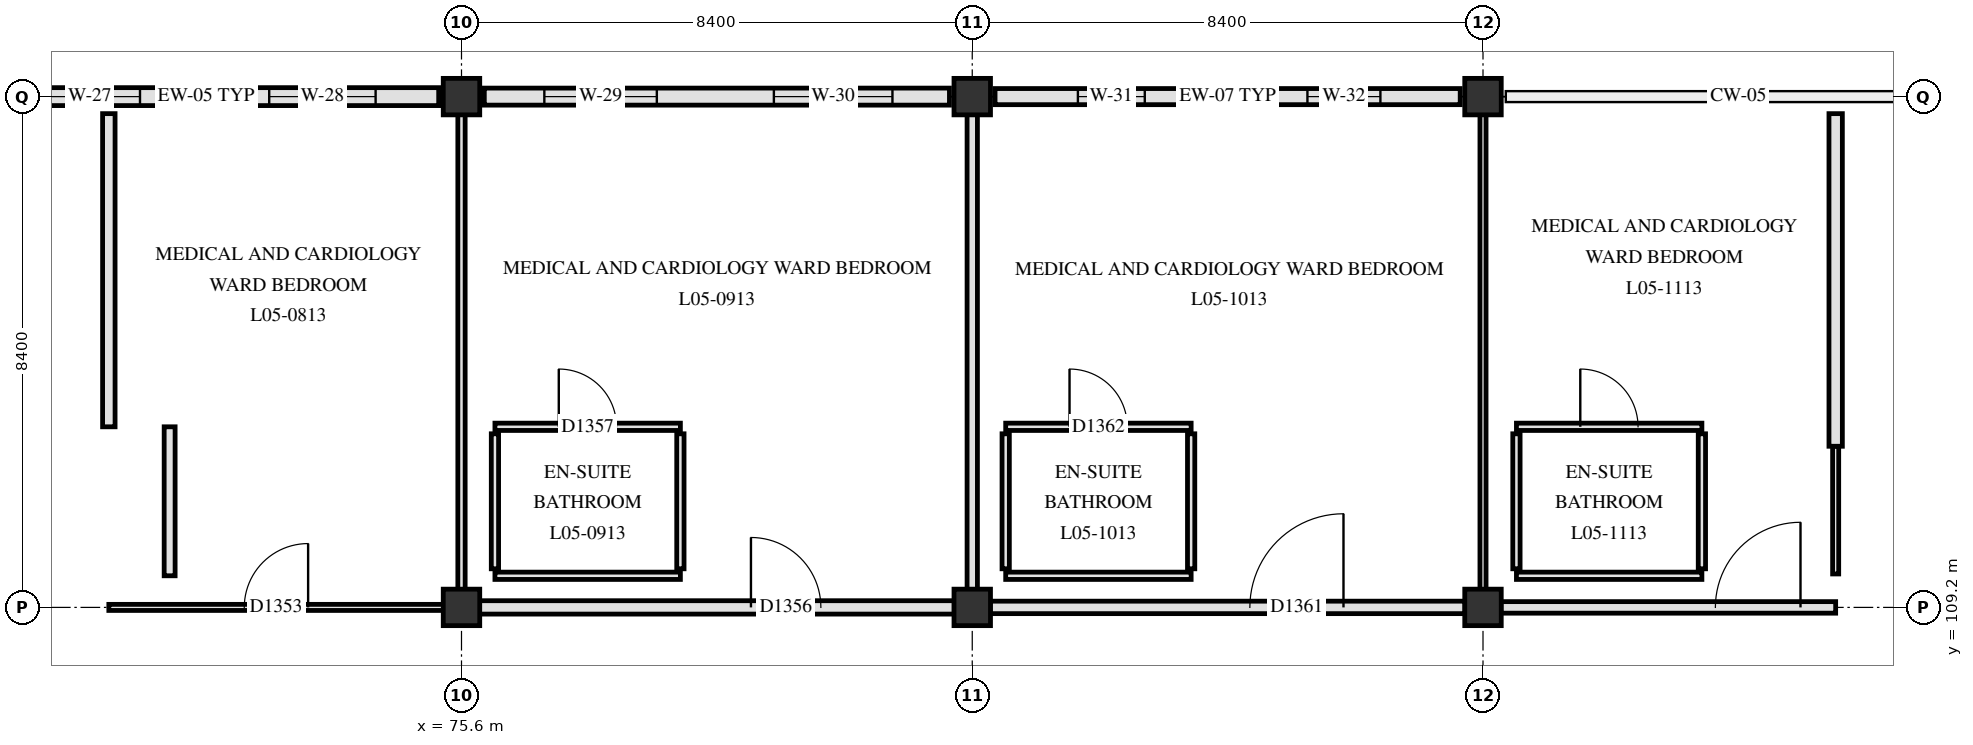
"""IFC4 building model, lengths in metres.
Left out: names, types, materials, properties, quantities, classifications, styles, units other than length and angle.
Written with IfcOpenShell. Run it as: python <this file> out.ifc"""

import sys

from ifc_helpers import new_model, si_unit, direction, frame, frame_2d, origin, origin_2d, place, context, subcontext, project, spatial, rectangle, extrude, element, fill, save


model = new_model("IFC4")
c1 = context("Model", 3, precision=1e-05, world=origin(), true_north=direction((0.0, 1.0)))
c2 = subcontext(c1, "Body", "Model", "MODEL_VIEW")
j1 = project(units=[si_unit("LENGTHUNIT", "METRE"), si_unit("PLANEANGLEUNIT", "RADIAN")], contexts=[c1])
p1 = place(None, origin())
s1 = spatial("IfcSite", under=j1, at=p1, CompositionType="ELEMENT")
p2 = place(p1, origin())
s2 = spatial("IfcBuilding", under=s1, at=p2, CompositionType="ELEMENT")
p3 = place(p2, frame((0.0, 0.0, 22.5)))
s3 = spatial("IfcBuildingStorey", under=s2, at=p3, CompositionType="ELEMENT", Elevation=22.5)
for number, where, z_axis, x_axis in (
    (1, (75.6, 109.2, 0.0), (0.0, 0.0, 1.0), (1.0, 0.0, 0.0)),
    (2, (75.6, 117.6, 0.0), (0.0, 0.0, 1.0), (1.0, 0.0, 0.0)),
    (3, (84.0, 109.2, 0.0), (0.0, 0.0, 1.0), (1.0, 0.0, 0.0)),
    (4, (84.0, 117.6, 0.0), (0.0, 0.0, 1.0), (1.0, 0.0, 0.0)),
    (5, (92.4, 109.2, 0.0), (0.0, 0.0, 1.0), (1.0, 0.0, 0.0)),
    (6, (92.4, 117.6, 0.0), (0.0, 0.0, 1.0), (1.0, 0.0, 0.0)),
):
    element("IfcColumn", number, at=place(p3, frame(where, z_axis=z_axis, x_axis=x_axis)), inside=s3, PredefinedType="COLUMN", context=c2, shape_type="SweptSolid", body=[
        extrude(rectangle(XDim=0.6, YDim=0.6, at=origin_2d()), origin(), (0.0, 0.0, 1.0), 3.9),
    ])
p4 = place(p3, frame((67.575, 117.6, 0.0), z_axis=(0.0, 0.0, 1.0), x_axis=(1.0, 0.0, 0.0)))
e7 = element("IfcWall", 7, at=p4, inside=s3, PredefinedType="SOLIDWALL", context=c2, shape_type="SweptSolid", body=[
    extrude(rectangle(XDim=7.65, YDim=0.295, at=frame_2d((3.825, 0.0))), origin(), (0.0, 0.0, 1.0), 3.31),
])
p5 = place(p4, frame((1.087, 0.0, 0.85)))
e8 = element("IfcOpeningElement", 8, at=p5, cuts=e7, PredefinedType="OPENING", context=c2, shape_type="SweptSolid", body=[
    extrude(rectangle(XDim=1.65, YDim=1.54, at=frame_2d((0.825, 0.77))), frame((0.0, 0.157, 0.0), z_axis=(0.0, -1.0, 0.0), x_axis=(1.0, 0.0, 0.0)), (0.0, 0.0, 1.0), 0.315),
])
p6 = place(p4, frame((4.863, 0.0, 0.85)))
e9 = element("IfcOpeningElement", 9, at=p6, cuts=e7, PredefinedType="OPENING", context=c2, shape_type="SweptSolid", body=[
    extrude(rectangle(XDim=1.75, YDim=1.54, at=frame_2d((0.875, 0.77))), frame((0.0, 0.157, 0.0), z_axis=(0.0, -1.0, 0.0), x_axis=(1.0, 0.0, 0.0)), (0.0, 0.0, 1.0), 0.315),
])
p7 = place(p3, frame((75.975, 117.6, 0.0), z_axis=(0.0, 0.0, 1.0), x_axis=(1.0, 0.0, 0.0)))
e10 = element("IfcWall", 10, at=p7, inside=s3, PredefinedType="SOLIDWALL", context=c2, shape_type="SweptSolid", body=[
    extrude(rectangle(XDim=7.65, YDim=0.28, at=frame_2d((3.825, 0.0))), origin(), (0.0, 0.0, 1.0), 3.31),
])
p8 = place(p7, frame((0.988, 0.0, 0.85)))
e11 = element("IfcOpeningElement", 11, at=p8, cuts=e10, PredefinedType="OPENING", context=c2, shape_type="SweptSolid", body=[
    extrude(rectangle(XDim=1.85, YDim=1.54, at=frame_2d((0.925, 0.77))), frame((0.0, 0.15, 0.0), z_axis=(0.0, -1.0, 0.0), x_axis=(1.0, 0.0, 0.0)), (0.0, 0.0, 1.0), 0.3),
])
p9 = place(p7, frame((4.762, 0.0, 0.85)))
e12 = element("IfcOpeningElement", 12, at=p9, cuts=e10, PredefinedType="OPENING", context=c2, shape_type="SweptSolid", body=[
    extrude(rectangle(XDim=1.95, YDim=1.54, at=frame_2d((0.975, 0.77))), frame((0.0, 0.15, 0.0), z_axis=(0.0, -1.0, 0.0), x_axis=(1.0, 0.0, 0.0)), (0.0, 0.0, 1.0), 0.3),
])
p10 = place(p3, frame((84.375, 117.6, 0.0), z_axis=(0.0, 0.0, 1.0), x_axis=(1.0, 0.0, 0.0)))
e13 = element("IfcWall", 13, at=p10, inside=s3, PredefinedType="SOLIDWALL", context=c2, shape_type="SweptSolid", body=[
    extrude(rectangle(XDim=7.65, YDim=0.265, at=frame_2d((3.825, 0.0))), origin(), (0.0, 0.0, 1.0), 3.31),
])
p11 = place(p10, frame((1.363, 0.0, 0.85)))
e14 = element("IfcOpeningElement", 14, at=p11, cuts=e13, PredefinedType="OPENING", context=c2, shape_type="SweptSolid", body=[
    extrude(rectangle(XDim=1.1, YDim=1.66, at=frame_2d((0.55, 0.83))), frame((0.0, 0.142, 0.0), z_axis=(0.0, -1.0, 0.0), x_axis=(1.0, 0.0, 0.0)), (0.0, 0.0, 1.0), 0.285),
])
p12 = place(p10, frame((5.137, 0.0, 0.85)))
e15 = element("IfcOpeningElement", 15, at=p12, cuts=e13, PredefinedType="OPENING", context=c2, shape_type="SweptSolid", body=[
    extrude(rectangle(XDim=1.2, YDim=1.66, at=frame_2d((0.6, 0.83))), frame((0.0, 0.142, 0.0), z_axis=(0.0, -1.0, 0.0), x_axis=(1.0, 0.0, 0.0)), (0.0, 0.0, 1.0), 0.285),
])
p13 = place(p3, frame((69.8, 109.2, 0.0), z_axis=(0.0, 0.0, 1.0), x_axis=(1.0, 0.0, 0.0)))
e16 = element("IfcWall", 16, at=p13, inside=s3, PredefinedType="PARTITIONING", context=c2, shape_type="SweptSolid", body=[
    extrude(rectangle(XDim=5.505, YDim=0.1, at=frame_2d((2.752, 0.0))), origin(), (0.0, 0.0, 1.0), 3.16),
])
p14 = place(p13, frame((2.228, 0.0, 0.0)))
e17 = element("IfcOpeningElement", 17, at=p14, cuts=e16, PredefinedType="OPENING", context=c2, shape_type="SweptSolid", body=[
    extrude(rectangle(XDim=1.05, YDim=2.15, at=frame_2d((0.525, 1.075))), frame((0.0, 0.06, 0.0), z_axis=(0.0, -1.0, 0.0), x_axis=(1.0, 0.0, 0.0)), (0.0, 0.0, 1.0), 0.12),
])
p15 = place(p3, frame((75.895, 109.2, 0.0), z_axis=(0.0, 0.0, 1.0), x_axis=(1.0, 0.0, 0.0)))
e18 = element("IfcWall", 18, at=p15, inside=s3, PredefinedType="PARTITIONING", context=c2, shape_type="SweptSolid", body=[
    extrude(rectangle(XDim=7.81, YDim=0.22, at=frame_2d((3.905, 0.0))), origin(), (0.0, 0.0, 1.0), 3.16),
])
p16 = place(p15, frame((4.466, 0.0, 0.0)))
e19 = element("IfcOpeningElement", 19, at=p16, cuts=e18, PredefinedType="OPENING", context=c2, shape_type="SweptSolid", body=[
    extrude(rectangle(XDim=1.15, YDim=2.15, at=frame_2d((0.575, 1.075))), frame((0.0, 0.12, 0.0), z_axis=(0.0, -1.0, 0.0), x_axis=(1.0, 0.0, 0.0)), (0.0, 0.0, 1.0), 0.24),
])
p17 = place(p3, frame((84.295, 109.2, 0.0), z_axis=(0.0, 0.0, 1.0), x_axis=(1.0, 0.0, 0.0)))
e20 = element("IfcWall", 20, at=p17, inside=s3, PredefinedType="PARTITIONING", context=c2, shape_type="SweptSolid", body=[
    extrude(rectangle(XDim=7.81, YDim=0.205, at=frame_2d((3.905, 0.0))), origin(), (0.0, 0.0, 1.0), 3.16),
])
p18 = place(p17, frame((4.271, 0.0, 0.0)))
e21 = element("IfcOpeningElement", 21, at=p18, cuts=e20, PredefinedType="OPENING", context=c2, shape_type="SweptSolid", body=[
    extrude(rectangle(XDim=1.54, YDim=2.24, at=frame_2d((0.77, 1.12))), frame((0.0, 0.113, 0.0), z_axis=(0.0, -1.0, 0.0), x_axis=(1.0, 0.0, 0.0)), (0.0, 0.0, 1.0), 0.225),
])
p19 = place(p3, frame((92.695, 109.2, 0.0), z_axis=(0.0, 0.0, 1.0), x_axis=(1.0, 0.0, 0.0)))
e22 = element("IfcWall", 22, at=p19, inside=s3, PredefinedType="PARTITIONING", context=c2, shape_type="SweptSolid", body=[
    extrude(rectangle(XDim=5.505, YDim=0.19, at=frame_2d((2.752, 0.0))), origin(), (0.0, 0.0, 1.0), 3.16),
])
p20 = place(p19, frame((3.527, 0.0, 0.0)))
e23 = element("IfcOpeningElement", 23, at=p20, cuts=e22, PredefinedType="OPENING", context=c2, shape_type="SweptSolid", body=[
    extrude(rectangle(XDim=1.4, YDim=2.2, at=frame_2d((0.7, 1.1))), frame((0.0, 0.105, 0.0), z_axis=(0.0, -1.0, 0.0), x_axis=(1.0, 0.0, 0.0)), (0.0, 0.0, 1.0), 0.21),
])
for number, where, z_axis, x_axis in (
    (24, (76.15, 109.72, 0.0), (0.0, 0.0, 1.0), (1.0, 0.0, 0.0)),
    (25, (84.55, 109.72, 0.0), (0.0, 0.0, 1.0), (1.0, 0.0, 0.0)),
    (26, (92.95, 109.72, 0.0), (0.0, 0.0, 1.0), (1.0, 0.0, 0.0)),
):
    element("IfcWall", number, at=place(p3, frame(where, z_axis=z_axis, x_axis=x_axis)), inside=s3, PredefinedType="PARTITIONING", context=c2, shape_type="SweptSolid", body=[
        extrude(rectangle(XDim=3.05, YDim=0.12, at=frame_2d((1.525, 0.0))), origin(), (0.0, 0.0, 1.0), 3.61),
    ])
p21 = place(p3, frame((76.15, 112.17, 0.0), z_axis=(0.0, 0.0, 1.0), x_axis=(1.0, 0.0, 0.0)))
e27 = element("IfcWall", 27, at=p21, inside=s3, PredefinedType="PARTITIONING", context=c2, shape_type="SweptSolid", body=[
    extrude(rectangle(XDim=3.05, YDim=0.12, at=frame_2d((1.525, 0.0))), origin(), (0.0, 0.0, 1.0), 3.61),
])
p22 = place(p21, frame((1.05, 0.0, 0.0)))
e28 = element("IfcOpeningElement", 28, at=p22, cuts=e27, PredefinedType="OPENING", context=c2, shape_type="SweptSolid", body=[
    extrude(rectangle(XDim=0.95, YDim=2.1, at=frame_2d((0.475, 1.05))), frame((0.0, 0.07, 0.0), z_axis=(0.0, -1.0, 0.0), x_axis=(1.0, 0.0, 0.0)), (0.0, 0.0, 1.0), 0.14),
])
p23 = place(p3, frame((84.55, 112.17, 0.0), z_axis=(0.0, 0.0, 1.0), x_axis=(1.0, 0.0, 0.0)))
e29 = element("IfcWall", 29, at=p23, inside=s3, PredefinedType="PARTITIONING", context=c2, shape_type="SweptSolid", body=[
    extrude(rectangle(XDim=3.05, YDim=0.12, at=frame_2d((1.525, 0.0))), origin(), (0.0, 0.0, 1.0), 3.61),
])
p24 = place(p23, frame((1.05, 0.0, 0.0)))
e30 = element("IfcOpeningElement", 30, at=p24, cuts=e29, PredefinedType="OPENING", context=c2, shape_type="SweptSolid", body=[
    extrude(rectangle(XDim=0.95, YDim=2.1, at=frame_2d((0.475, 1.05))), frame((0.0, 0.07, 0.0), z_axis=(0.0, -1.0, 0.0), x_axis=(1.0, 0.0, 0.0)), (0.0, 0.0, 1.0), 0.14),
])
p25 = place(p3, frame((92.95, 112.17, 0.0), z_axis=(0.0, 0.0, 1.0), x_axis=(1.0, 0.0, 0.0)))
e31 = element("IfcWall", 31, at=p25, inside=s3, PredefinedType="PARTITIONING", context=c2, shape_type="SweptSolid", body=[
    extrude(rectangle(XDim=3.05, YDim=0.12, at=frame_2d((1.525, 0.0))), origin(), (0.0, 0.0, 1.0), 3.61),
])
p26 = place(p25, frame((1.05, 0.0, 0.0)))
e32 = element("IfcOpeningElement", 32, at=p26, cuts=e31, PredefinedType="OPENING", context=c2, shape_type="SweptSolid", body=[
    extrude(rectangle(XDim=0.95, YDim=2.1, at=frame_2d((0.475, 1.05))), frame((0.0, 0.07, 0.0), z_axis=(0.0, -1.0, 0.0), x_axis=(1.0, 0.0, 0.0)), (0.0, 0.0, 1.0), 0.14),
])
p27 = place(p3, frame((69.8, 112.17, 0.0), z_axis=(0.0, 0.0, 1.0), x_axis=(0.0, 1.0, 0.0)))
e33 = element("IfcWall", 33, at=p27, inside=s3, PredefinedType="PARTITIONING", context=c2, shape_type="SweptSolid", body=[
    extrude(rectangle(XDim=5.15, YDim=0.205, at=frame_2d((2.575, 0.0))), origin(), (0.0, 0.0, 1.0), 3.34),
])
p28 = place(p3, frame((70.8, 109.72, 0.0), z_axis=(0.0, 0.0, 1.0), x_axis=(0.0, 1.0, 0.0)))
e34 = element("IfcWall", 34, at=p28, inside=s3, PredefinedType="PARTITIONING", context=c2, shape_type="SweptSolid", body=[
    extrude(rectangle(XDim=2.45, YDim=0.18, at=frame_2d((1.225, 0.0))), origin(), (0.0, 0.0, 1.0), 3.34),
])
p29 = place(p3, frame((75.6, 109.495, 0.0), z_axis=(0.0, 0.0, 1.0), x_axis=(0.0, 1.0, 0.0)))
e35 = element("IfcWall", 35, at=p29, inside=s3, PredefinedType="PARTITIONING", context=c2, shape_type="SweptSolid", body=[
    extrude(rectangle(XDim=7.81, YDim=0.12, at=frame_2d((3.905, 0.0))), origin(), (0.0, 0.0, 1.0), 3.3),
])
for number, where, z_axis, x_axis in (
    (36, (76.15, 109.835, 0.0), (0.0, 0.0, 1.0), (0.0, 1.0, 0.0)),
    (37, (79.2, 109.835, 0.0), (0.0, 0.0, 1.0), (0.0, 1.0, 0.0)),
):
    element("IfcWall", number, at=place(p3, frame(where, z_axis=z_axis, x_axis=x_axis)), inside=s3, PredefinedType="PARTITIONING", context=c2, shape_type="SweptSolid", body=[
        extrude(rectangle(XDim=2.22, YDim=0.12, at=frame_2d((1.11, 0.0))), origin(), (0.0, 0.0, 1.0), 3.34),
    ])
p30 = place(p3, frame((84.0, 109.495, 0.0), z_axis=(0.0, 0.0, 1.0), x_axis=(0.0, 1.0, 0.0)))
e38 = element("IfcWall", 38, at=p30, inside=s3, PredefinedType="PARTITIONING", context=c2, shape_type="SweptSolid", body=[
    extrude(rectangle(XDim=7.81, YDim=0.17, at=frame_2d((3.905, 0.0))), origin(), (0.0, 0.0, 1.0), 3.3),
])
for number, where, z_axis, x_axis in (
    (39, (84.55, 109.835, 0.0), (0.0, 0.0, 1.0), (0.0, 1.0, 0.0)),
    (40, (87.6, 109.835, 0.0), (0.0, 0.0, 1.0), (0.0, 1.0, 0.0)),
):
    element("IfcWall", number, at=place(p3, frame(where, z_axis=z_axis, x_axis=x_axis)), inside=s3, PredefinedType="PARTITIONING", context=c2, shape_type="SweptSolid", body=[
        extrude(rectangle(XDim=2.22, YDim=0.12, at=frame_2d((1.11, 0.0))), origin(), (0.0, 0.0, 1.0), 3.34),
    ])
p31 = place(p3, frame((92.4, 109.495, 0.0), z_axis=(0.0, 0.0, 1.0), x_axis=(0.0, 1.0, 0.0)))
e41 = element("IfcWall", 41, at=p31, inside=s3, PredefinedType="PARTITIONING", context=c2, shape_type="SweptSolid", body=[
    extrude(rectangle(XDim=7.81, YDim=0.1, at=frame_2d((3.905, 0.0))), origin(), (0.0, 0.0, 1.0), 3.3),
])
for number, where, z_axis, x_axis in (
    (42, (92.95, 109.835, 0.0), (0.0, 0.0, 1.0), (0.0, 1.0, 0.0)),
    (43, (96.0, 109.835, 0.0), (0.0, 0.0, 1.0), (0.0, 1.0, 0.0)),
):
    element("IfcWall", number, at=place(p3, frame(where, z_axis=z_axis, x_axis=x_axis)), inside=s3, PredefinedType="PARTITIONING", context=c2, shape_type="SweptSolid", body=[
        extrude(rectangle(XDim=2.22, YDim=0.12, at=frame_2d((1.11, 0.0))), origin(), (0.0, 0.0, 1.0), 3.34),
    ])
p32 = place(p3, frame((98.2, 109.75, 0.0), z_axis=(0.0, 0.0, 1.0), x_axis=(0.0, 1.0, 0.0)))
e44 = element("IfcWall", 44, at=p32, inside=s3, PredefinedType="PARTITIONING", context=c2, shape_type="SweptSolid", body=[
    extrude(rectangle(XDim=2.1, YDim=0.1, at=frame_2d((1.05, 0.0))), origin(), (0.0, 0.0, 1.0), 3.61),
])
p33 = place(p3, frame((98.2, 111.85, 0.0), z_axis=(0.0, 0.0, 1.0), x_axis=(0.0, 1.0, 0.0)))
e45 = element("IfcWall", 45, at=p33, inside=s3, PredefinedType="PARTITIONING", context=c2, shape_type="SweptSolid", body=[
    extrude(rectangle(XDim=5.47, YDim=0.22, at=frame_2d((2.735, 0.0))), origin(), (0.0, 0.0, 1.0), 3.34),
])
p34 = place(p5, origin())
e46 = element("IfcWindow", 46, at=p34, inside=s3, PartitioningType="SINGLE_PANEL", PredefinedType="WINDOW", context=c2, shape_type="SweptSolid", body=[
    extrude(rectangle(XDim=1.65, YDim=1.54, at=frame_2d((0.825, 0.77))), frame((0.0, 0.03, 0.0), z_axis=(0.0, -1.0, 0.0), x_axis=(1.0, 0.0, 0.0)), (0.0, 0.0, 1.0), 0.06),
])
fill(e8, e46)
p35 = place(p6, origin())
e47 = element("IfcWindow", 47, at=p35, inside=s3, PartitioningType="SINGLE_PANEL", PredefinedType="WINDOW", context=c2, shape_type="SweptSolid", body=[
    extrude(rectangle(XDim=1.75, YDim=1.54, at=frame_2d((0.875, 0.77))), frame((0.0, 0.03, 0.0), z_axis=(0.0, -1.0, 0.0), x_axis=(1.0, 0.0, 0.0)), (0.0, 0.0, 1.0), 0.06),
])
fill(e9, e47)
p36 = place(p8, origin())
e48 = element("IfcWindow", 48, at=p36, inside=s3, PartitioningType="SINGLE_PANEL", PredefinedType="WINDOW", context=c2, shape_type="SweptSolid", body=[
    extrude(rectangle(XDim=1.85, YDim=1.54, at=frame_2d((0.925, 0.77))), frame((0.0, 0.03, 0.0), z_axis=(0.0, -1.0, 0.0), x_axis=(1.0, 0.0, 0.0)), (0.0, 0.0, 1.0), 0.06),
])
fill(e11, e48)
p37 = place(p9, origin())
e49 = element("IfcWindow", 49, at=p37, inside=s3, PartitioningType="SINGLE_PANEL", PredefinedType="WINDOW", context=c2, shape_type="SweptSolid", body=[
    extrude(rectangle(XDim=1.95, YDim=1.54, at=frame_2d((0.975, 0.77))), frame((0.0, 0.03, 0.0), z_axis=(0.0, -1.0, 0.0), x_axis=(1.0, 0.0, 0.0)), (0.0, 0.0, 1.0), 0.06),
])
fill(e12, e49)
p38 = place(p11, origin())
e50 = element("IfcWindow", 50, at=p38, inside=s3, PartitioningType="SINGLE_PANEL", PredefinedType="WINDOW", context=c2, shape_type="SweptSolid", body=[
    extrude(rectangle(XDim=1.1, YDim=1.66, at=frame_2d((0.55, 0.83))), frame((0.0, 0.03, 0.0), z_axis=(0.0, -1.0, 0.0), x_axis=(1.0, 0.0, 0.0)), (0.0, 0.0, 1.0), 0.06),
])
fill(e14, e50)
p39 = place(p12, origin())
e51 = element("IfcWindow", 51, at=p39, inside=s3, PartitioningType="SINGLE_PANEL", PredefinedType="WINDOW", context=c2, shape_type="SweptSolid", body=[
    extrude(rectangle(XDim=1.2, YDim=1.66, at=frame_2d((0.6, 0.83))), frame((0.0, 0.03, 0.0), z_axis=(0.0, -1.0, 0.0), x_axis=(1.0, 0.0, 0.0)), (0.0, 0.0, 1.0), 0.06),
])
fill(e15, e51)
p40 = place(p14, origin())
e52 = element("IfcDoor", 52, at=p40, inside=s3, OperationType="SINGLE_SWING_RIGHT", PredefinedType="DOOR", context=c2, shape_type="SweptSolid", body=[
    extrude(rectangle(XDim=1.05, YDim=2.15, at=frame_2d((0.525, 1.075))), frame((0.0, 0.025, 0.0), z_axis=(0.0, -1.0, 0.0), x_axis=(1.0, 0.0, 0.0)), (0.0, 0.0, 1.0), 0.05),
])
fill(e17, e52)
p41 = place(p16, origin())
e53 = element("IfcDoor", 53, at=p41, inside=s3, OperationType="SINGLE_SWING_LEFT", PredefinedType="DOOR", context=c2, shape_type="SweptSolid", body=[
    extrude(rectangle(XDim=1.15, YDim=2.15, at=frame_2d((0.575, 1.075))), frame((0.0, 0.025, 0.0), z_axis=(0.0, -1.0, 0.0), x_axis=(1.0, 0.0, 0.0)), (0.0, 0.0, 1.0), 0.05),
])
fill(e19, e53)
p42 = place(p22, origin())
e54 = element("IfcDoor", 54, at=p42, inside=s3, OperationType="SINGLE_SWING_LEFT", PredefinedType="DOOR", context=c2, shape_type="SweptSolid", body=[
    extrude(rectangle(XDim=0.95, YDim=2.1, at=frame_2d((0.475, 1.05))), frame((0.0, 0.025, 0.0), z_axis=(0.0, -1.0, 0.0), x_axis=(1.0, 0.0, 0.0)), (0.0, 0.0, 1.0), 0.05),
])
fill(e28, e54)
p43 = place(p18, origin())
e55 = element("IfcDoor", 55, at=p43, inside=s3, OperationType="SINGLE_SWING_RIGHT", PredefinedType="DOOR", context=c2, shape_type="SweptSolid", body=[
    extrude(rectangle(XDim=1.54, YDim=2.24, at=frame_2d((0.77, 1.12))), frame((0.0, 0.025, 0.0), z_axis=(0.0, -1.0, 0.0), x_axis=(1.0, 0.0, 0.0)), (0.0, 0.0, 1.0), 0.05),
])
fill(e21, e55)
p44 = place(p24, origin())
e56 = element("IfcDoor", 56, at=p44, inside=s3, OperationType="SINGLE_SWING_LEFT", PredefinedType="DOOR", context=c2, shape_type="SweptSolid", body=[
    extrude(rectangle(XDim=0.95, YDim=2.1, at=frame_2d((0.475, 1.05))), frame((0.0, 0.025, 0.0), z_axis=(0.0, -1.0, 0.0), x_axis=(1.0, 0.0, 0.0)), (0.0, 0.0, 1.0), 0.05),
])
fill(e30, e56)
p45 = place(p20, origin())
e57 = element("IfcDoor", 57, at=p45, inside=s3, OperationType="SINGLE_SWING_RIGHT", PredefinedType="DOOR", context=c2, shape_type="SweptSolid", body=[
    extrude(rectangle(XDim=1.4, YDim=2.2, at=frame_2d((0.7, 1.1))), frame((0.0, 0.025, 0.0), z_axis=(0.0, -1.0, 0.0), x_axis=(1.0, 0.0, 0.0)), (0.0, 0.0, 1.0), 0.05),
])
fill(e23, e57)
p46 = place(p26, origin())
e58 = element("IfcDoor", 58, at=p46, inside=s3, OperationType="SINGLE_SWING_LEFT", PredefinedType="DOOR", context=c2, shape_type="SweptSolid", body=[
    extrude(rectangle(XDim=0.95, YDim=2.1, at=frame_2d((0.475, 1.05))), frame((0.0, 0.025, 0.0), z_axis=(0.0, -1.0, 0.0), x_axis=(1.0, 0.0, 0.0)), (0.0, 0.0, 1.0), 0.05),
])
fill(e32, e58)
save(model, sys.argv[1])
